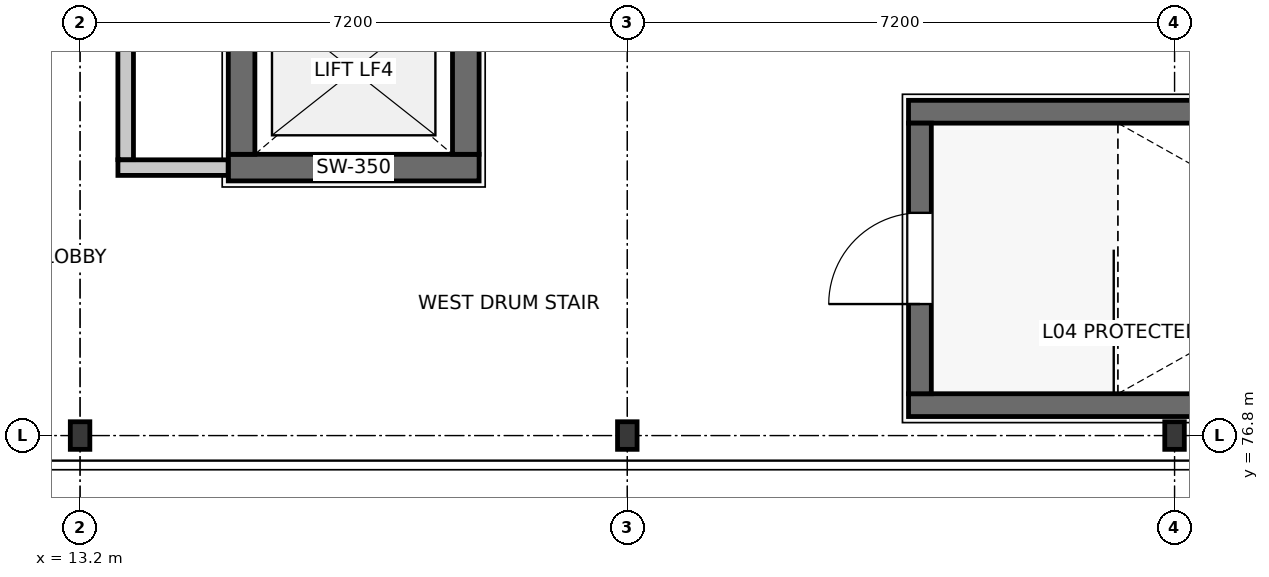
"""IFC4 building model, lengths in metres.
Left out: names, types, materials, properties, quantities, classifications, styles, units other than length and angle.
Written with IfcOpenShell. Run it as: python <this file> out.ifc"""

import sys

from ifc_helpers import new_model, si_unit, direction, frame, frame_2d, origin, origin_2d, place, context, subcontext, project, spatial, rectangle, i_section, extrude, element, fill, save


model = new_model("IFC4")
c1 = context("Model", 3, precision=1e-05, world=origin(), true_north=direction((0.0, 1.0)))
c2 = subcontext(c1, "Body", "Model", "MODEL_VIEW")
j1 = project(units=[si_unit("LENGTHUNIT", "METRE"), si_unit("PLANEANGLEUNIT", "RADIAN")], contexts=[c1])
p1 = place(None, origin())
s1 = spatial("IfcSite", under=j1, at=p1, CompositionType="ELEMENT")
p2 = place(p1, origin())
s2 = spatial("IfcBuilding", under=s1, at=p2, CompositionType="ELEMENT")
p3 = place(p2, frame((0.0, 0.0, 17.1)))
s3 = spatial("IfcBuildingStorey", under=s2, at=p3, CompositionType="ELEMENT", Elevation=17.1)
for number, where, z_axis, x_axis in (
    (1, (13.2, 76.8, 0.0), (0.0, 0.0, 1.0), (1.0, 0.0, 0.0)),
    (2, (20.4, 76.8, 0.0), (0.0, 0.0, 1.0), (1.0, 0.0, 0.0)),
    (3, (27.6, 76.8, 0.0), (0.0, 0.0, 1.0), (1.0, 0.0, 0.0)),
):
    element("IfcColumn", number, at=place(p3, frame(where, z_axis=z_axis, x_axis=x_axis)), inside=s3, PredefinedType="COLUMN", context=c2, shape_type="SweptSolid", body=[
        extrude(i_section(OverallWidth=0.257, OverallDepth=0.363, WebThickness=0.013, FlangeThickness=0.022, FilletRadius=0.015, at=origin_2d()), origin(), (0.0, 0.0, 1.0), 4.944),
    ])
for number, where, z_axis, x_axis in (
    (4, (33.5, 77.2, 0.0), (0.0, 0.0, 1.0), (-1.0, 0.0, 0.0)),
    (5, (24.1, 81.06, 0.0), (0.0, 0.0, 1.0), (1.0, 0.0, 0.0)),
):
    element("IfcWall", number, at=place(p3, frame(where, z_axis=z_axis, x_axis=x_axis)), inside=s3, PredefinedType="SOLIDWALL", context=c2, shape_type="SweptSolid", body=[
        extrude(rectangle(XDim=9.4, YDim=0.3, at=frame_2d((4.7, 0.0))), origin(), (0.0, 0.0, 1.0), 3.4),
    ])
p4 = place(p3, frame((24.25, 77.35, 0.0), z_axis=(0.0, 0.0, 1.0), x_axis=(0.0, 1.0, 0.0)))
e6 = element("IfcWall", 6, at=p4, inside=s3, PredefinedType="SOLIDWALL", context=c2, shape_type="SweptSolid", body=[
    extrude(rectangle(XDim=3.56, YDim=0.3, at=frame_2d((1.78, 0.0))), origin(), (0.0, 0.0, 1.0), 3.4),
])
p5 = place(p4, frame((1.18, 0.0, 0.0)))
e7 = element("IfcOpeningElement", 7, at=p5, cuts=e6, PredefinedType="OPENING", context=c2, shape_type="SweptSolid", body=[
    extrude(rectangle(XDim=1.2, YDim=2.2, at=frame_2d((0.6, 1.1))), frame((0.0, 0.16, 0.0), z_axis=(0.0, -1.0, 0.0), x_axis=(1.0, 0.0, 0.0)), (0.0, 0.0, 1.0), 0.32),
])
p6 = place(p3, frame((18.45, 80.325, 0.0), z_axis=(0.0, 0.0, 1.0), x_axis=(-1.0, 0.0, 0.0)))
e8 = element("IfcWall", 8, at=p6, inside=s3, PredefinedType="SHEAR", context=c2, shape_type="SweptSolid", body=[
    extrude(rectangle(XDim=3.3, YDim=0.35, at=frame_2d((1.65, 0.0))), origin(), (0.0, 0.0, 1.0), 3.4),
])
for number, where, z_axis, x_axis in (
    (9, (15.325, 80.5, 0.0), (0.0, 0.0, 1.0), (0.0, 1.0, 0.0)),
    (10, (18.275, 82.7, 0.0), (0.0, 0.0, 1.0), (0.0, -1.0, 0.0)),
):
    element("IfcWall", number, at=place(p3, frame(where, z_axis=z_axis, x_axis=x_axis)), inside=s3, PredefinedType="SHEAR", context=c2, shape_type="SweptSolid", body=[
        extrude(rectangle(XDim=2.2, YDim=0.35, at=frame_2d((1.1, 0.0))), origin(), (0.0, 0.0, 1.0), 3.4),
    ])
p7 = place(p3, frame((15.148, 80.325, 0.0), z_axis=(0.0, 0.0, 1.0), x_axis=(-1.0, 0.0, 0.0)))
e11 = element("IfcWall", 11, at=p7, inside=s3, PredefinedType="PARTITIONING", context=c2, shape_type="SweptSolid", body=[
    extrude(rectangle(XDim=1.45, YDim=0.205, at=frame_2d((0.725, 0.0))), origin(), (0.0, 0.0, 1.0), 3.518),
])
p8 = place(p3, frame((13.8, 80.43, 0.0), z_axis=(0.0, 0.0, 1.0), x_axis=(0.0, 1.0, 0.0)))
e12 = element("IfcWall", 12, at=p8, inside=s3, PredefinedType="PARTITIONING", context=c2, shape_type="SweptSolid", body=[
    extrude(rectangle(XDim=4.516, YDim=0.205, at=frame_2d((2.258, 0.0))), origin(), (0.0, 0.0, 1.0), 3.518),
])
p9 = place(p8, frame((1.788, 0.0, 0.0)))
e13 = element("IfcOpeningElement", 13, at=p9, cuts=e12, PredefinedType="OPENING", context=c2, shape_type="SweptSolid", body=[
    extrude(rectangle(XDim=0.94, YDim=2.1, at=frame_2d((0.47, 1.05))), frame((0.0, 0.113, 0.0), z_axis=(0.0, -1.0, 0.0), x_axis=(1.0, 0.0, 0.0)), (0.0, 0.0, 1.0), 0.225),
])
p10 = place(p5, origin())
e14 = element("IfcDoor", 14, at=p10, inside=s3, OperationType="SINGLE_SWING_LEFT", PredefinedType="DOOR", context=c2, shape_type="SweptSolid", body=[
    extrude(rectangle(XDim=1.2, YDim=2.2, at=frame_2d((0.6, 1.1))), frame((0.0, 0.025, 0.0), z_axis=(0.0, -1.0, 0.0), x_axis=(1.0, 0.0, 0.0)), (0.0, 0.0, 1.0), 0.05),
])
fill(e7, e14)
save(model, sys.argv[1])
